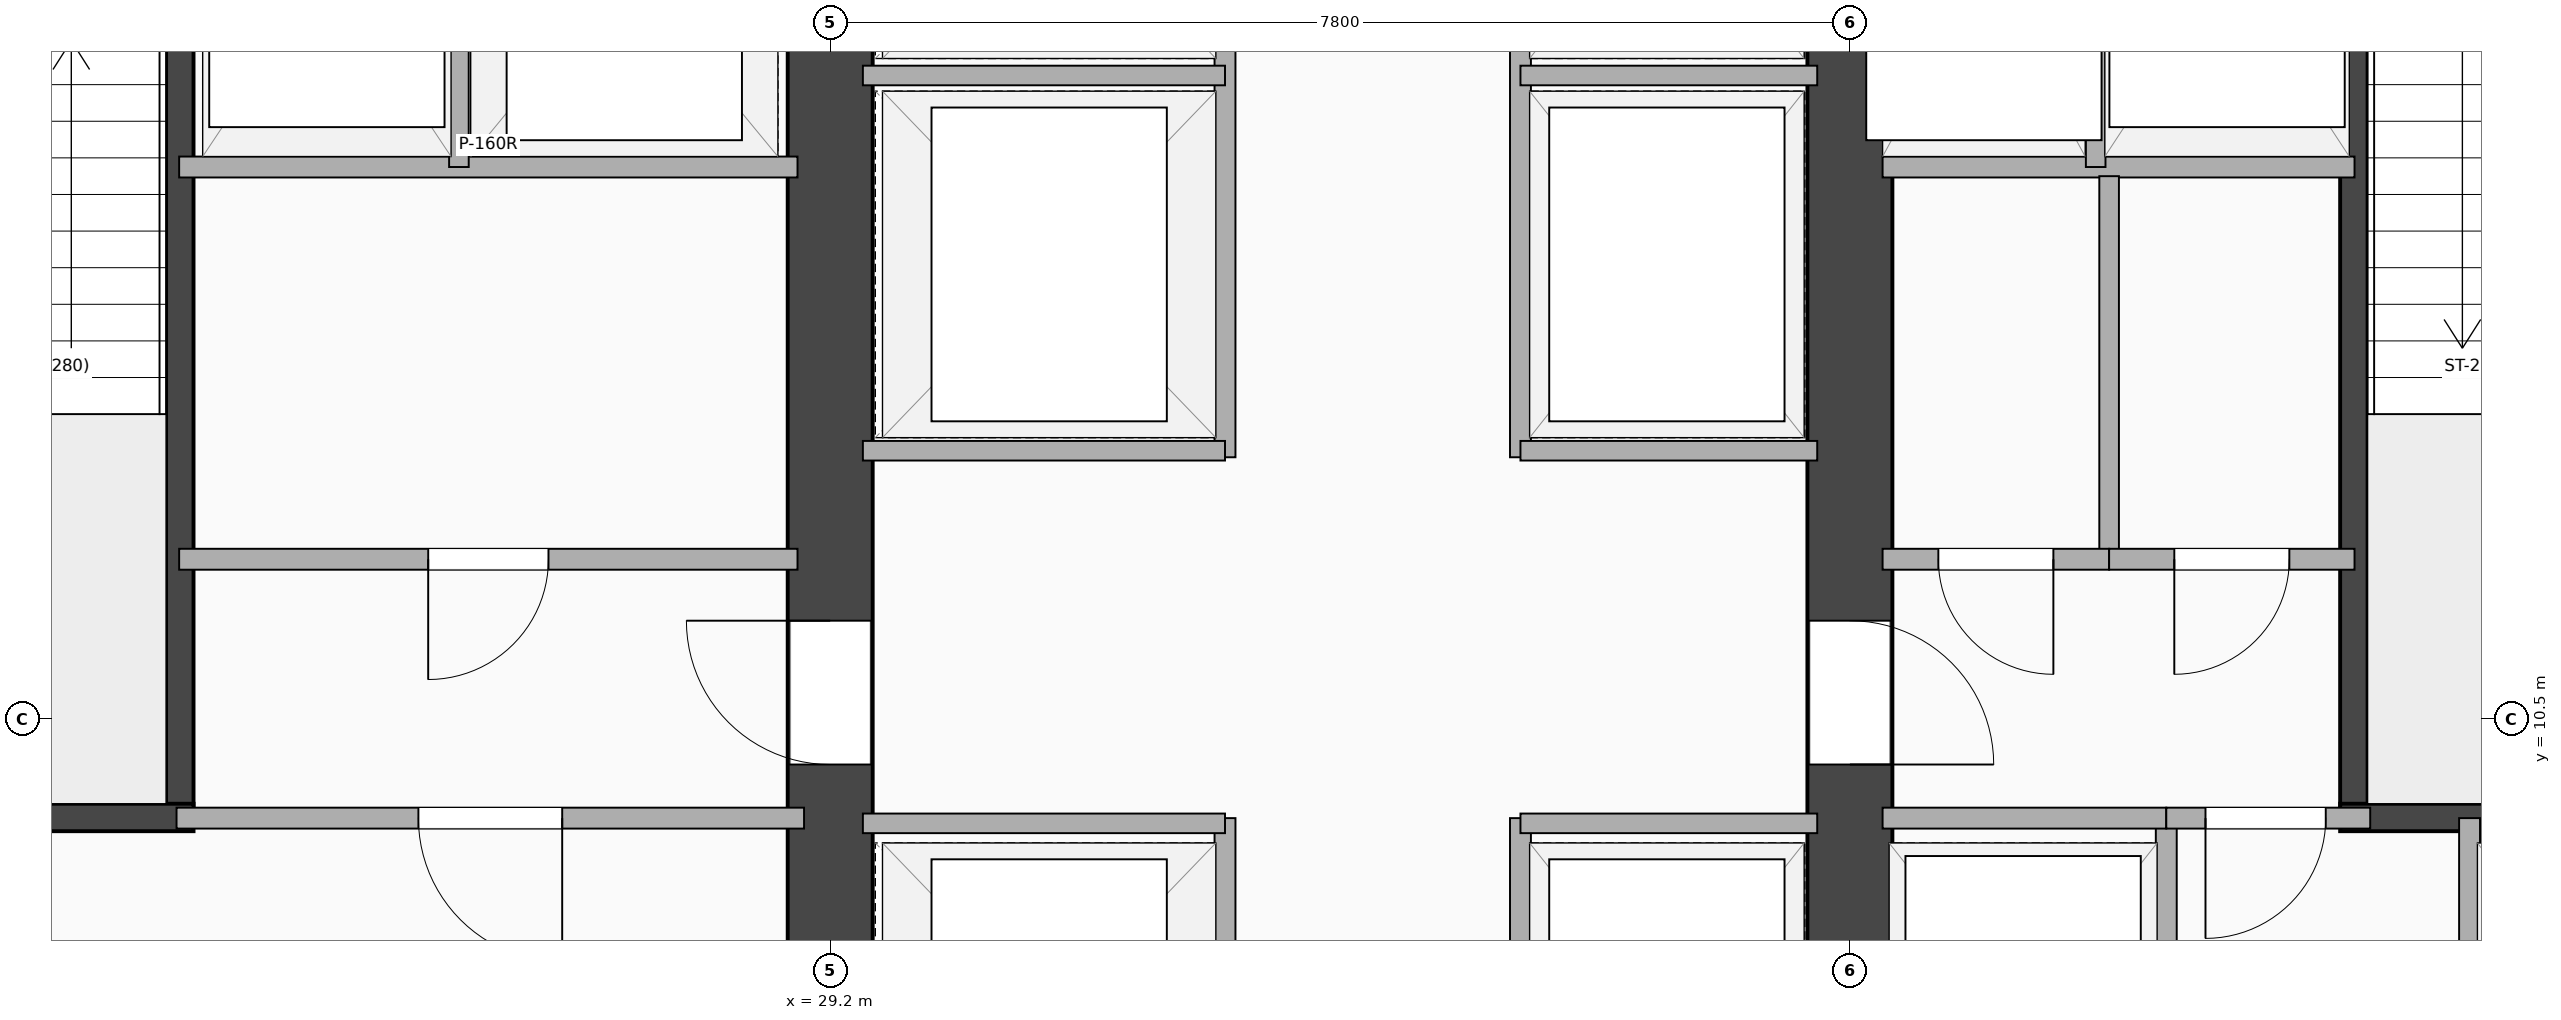
"""IFC4 building model, lengths in metres.
Left out: names, types, materials, properties, quantities, classifications, styles, units other than length and angle.
Written with IfcOpenShell. Run it as: python <this file> out.ifc"""

import sys

from ifc_helpers import new_model, si_unit, direction, frame, frame_2d, origin, place, context, subcontext, project, spatial, rectangle, extrude, element, fill, save


model = new_model("IFC4")
c1 = context("Model", 3, precision=1e-05, world=origin(), true_north=direction((0.0, 1.0)))
c2 = subcontext(c1, "Body", "Model", "MODEL_VIEW")
j1 = project(units=[si_unit("LENGTHUNIT", "METRE"), si_unit("PLANEANGLEUNIT", "RADIAN")], contexts=[c1])
p1 = place(None, origin())
s1 = spatial("IfcSite", under=j1, at=p1, CompositionType="ELEMENT")
p2 = place(p1, origin())
s2 = spatial("IfcBuilding", under=s1, at=p2, CompositionType="ELEMENT")
p3 = place(p2, frame((0.0, 0.0, 5.4)))
s3 = spatial("IfcBuildingStorey", under=s2, at=p3, CompositionType="ELEMENT", Elevation=5.4)
p4 = place(p3, frame((29.2, 3.5, 0.0), z_axis=(0.0, 0.0, 1.0), x_axis=(0.0, 1.0, 0.0)))
e1 = element("IfcWall", 1, at=p4, inside=s3, PredefinedType="SHEAR", context=c2, shape_type="SweptSolid", body=[
    extrude(rectangle(XDim=16.9, YDim=0.65, at=frame_2d((8.45, 0.0))), origin(), (0.0, 0.0, 1.0), 4.3),
])
p5 = place(p4, frame((7.75, 0.0, 0.0), z_axis=(0.0, 0.0, 1.0), x_axis=(-1.0, 0.0, 0.0)))
e2 = element("IfcOpeningElement", 2, at=p5, cuts=e1, PredefinedType="OPENING", context=c2, shape_type="SweptSolid", body=[
    extrude(rectangle(XDim=1.1, YDim=2.15, at=frame_2d((0.55, 1.075))), frame((0.0, 0.335, 0.0), z_axis=(0.0, -1.0, 0.0), x_axis=(1.0, 0.0, 0.0)), (0.0, 0.0, 1.0), 0.67),
])
p6 = place(p3, frame((37.0, 3.5, 0.0), z_axis=(0.0, 0.0, 1.0), x_axis=(0.0, 1.0, 0.0)))
e3 = element("IfcWall", 3, at=p6, inside=s3, PredefinedType="SHEAR", context=c2, shape_type="SweptSolid", body=[
    extrude(rectangle(XDim=16.9, YDim=0.65, at=frame_2d((8.45, 0.0))), origin(), (0.0, 0.0, 1.0), 4.3),
])
p7 = place(p6, frame((6.65, 0.0, 0.0)))
e4 = element("IfcOpeningElement", 4, at=p7, cuts=e3, PredefinedType="OPENING", context=c2, shape_type="SweptSolid", body=[
    extrude(rectangle(XDim=1.1, YDim=2.15, at=frame_2d((0.55, 1.075))), frame((0.0, 0.335, 0.0), z_axis=(0.0, -1.0, 0.0), x_axis=(1.0, 0.0, 0.0)), (0.0, 0.0, 1.0), 0.67),
])
p8 = place(p3, frame((24.225, 9.745, 0.0), z_axis=(0.0, 0.0, 1.0), x_axis=(0.0, 1.0, 0.0)))
e5 = element("IfcWall", 5, at=p8, inside=s3, PredefinedType="SHEAR", context=c2, shape_type="SweptSolid", body=[
    extrude(rectangle(XDim=8.01, YDim=0.21, at=frame_2d((4.005, 0.0))), origin(), (0.0, 0.0, 1.0), 4.3),
])
p9 = place(p3, frame((20.67, 9.745, 0.0), z_axis=(0.0, 0.0, 1.0), x_axis=(1.0, 0.0, 0.0)))
e6 = element("IfcWall", 6, at=p9, inside=s3, PredefinedType="SHEAR", context=c2, shape_type="SweptSolid", body=[
    extrude(rectangle(XDim=3.66, YDim=0.21, at=frame_2d((1.83, 0.0))), origin(), (0.0, 0.0, 1.0), 4.3),
])
p10 = place(p3, frame((40.855, 9.745, 0.0), z_axis=(0.0, 0.0, 1.0), x_axis=(0.0, 1.0, 0.0)))
e7 = element("IfcWall", 7, at=p10, inside=s3, PredefinedType="SHEAR", context=c2, shape_type="SweptSolid", body=[
    extrude(rectangle(XDim=8.01, YDim=0.21, at=frame_2d((4.005, 0.0))), origin(), (0.0, 0.0, 1.0), 4.3),
])
p11 = place(p3, frame((40.75, 9.745, 0.0), z_axis=(0.0, 0.0, 1.0), x_axis=(1.0, 0.0, 0.0)))
e8 = element("IfcWall", 8, at=p11, inside=s3, PredefinedType="SHEAR", context=c2, shape_type="SweptSolid", body=[
    extrude(rectangle(XDim=3.66, YDim=0.21, at=frame_2d((1.83, 0.0))), origin(), (0.0, 0.0, 1.0), 4.3),
])
p12 = place(p3, frame((24.22, 14.72, 0.0), z_axis=(0.0, 0.0, 1.0), x_axis=(1.0, 0.0, 0.0)))
e9 = element("IfcWall", 9, at=p12, inside=s3, PredefinedType="PARTITIONING", context=c2, shape_type="SweptSolid", body=[
    extrude(rectangle(XDim=4.73, YDim=0.16, at=frame_2d((2.365, 0.0))), origin(), (0.0, 0.0, 1.0), 3.43),
])
p13 = place(p3, frame((26.36, 14.72, 0.0), z_axis=(0.0, 0.0, 1.0), x_axis=(0.0, 1.0, 0.0)))
e10 = element("IfcWall", 10, at=p13, inside=s3, PredefinedType="PARTITIONING", context=c2, shape_type="SweptSolid", body=[
    extrude(rectangle(XDim=3.04, YDim=0.15, at=frame_2d((1.52, 0.0))), origin(), (0.0, 0.0, 1.0), 4.3),
])
p14 = place(p3, frame((37.25, 14.72, 0.0), z_axis=(0.0, 0.0, 1.0), x_axis=(1.0, 0.0, 0.0)))
e11 = element("IfcWall", 11, at=p14, inside=s3, PredefinedType="PARTITIONING", context=c2, shape_type="SweptSolid", body=[
    extrude(rectangle(XDim=3.61, YDim=0.16, at=frame_2d((1.805, 0.0))), origin(), (0.0, 0.0, 1.0), 3.43),
])
p15 = place(p3, frame((38.88, 14.72, 0.0), z_axis=(0.0, 0.0, 1.0), x_axis=(0.0, 1.0, 0.0)))
e12 = element("IfcWall", 12, at=p15, inside=s3, PredefinedType="PARTITIONING", context=c2, shape_type="SweptSolid", body=[
    extrude(rectangle(XDim=3.04, YDim=0.15, at=frame_2d((1.52, 0.0))), origin(), (0.0, 0.0, 1.0), 4.3),
])
p16 = place(p3, frame((24.22, 11.72, 0.0), z_axis=(0.0, 0.0, 1.0), x_axis=(1.0, 0.0, 0.0)))
e13 = element("IfcWall", 13, at=p16, inside=s3, PredefinedType="PARTITIONING", context=c2, shape_type="SweptSolid", body=[
    extrude(rectangle(XDim=4.73, YDim=0.16, at=frame_2d((2.365, 0.0))), origin(), (0.0, 0.0, 1.0), 3.43),
])
p17 = place(p16, frame((1.905, 0.0, 0.0)))
e14 = element("IfcOpeningElement", 14, at=p17, cuts=e13, PredefinedType="OPENING", context=c2, shape_type="SweptSolid", body=[
    extrude(rectangle(XDim=0.92, YDim=2.08, at=frame_2d((0.46, 1.04))), frame((0.0, 0.09, 0.0), z_axis=(0.0, -1.0, 0.0), x_axis=(1.0, 0.0, 0.0)), (0.0, 0.0, 1.0), 0.18),
])
p18 = place(p3, frame((38.983, 11.72, 0.0), z_axis=(0.0, 0.0, 1.0), x_axis=(0.0, 1.0, 0.0)))
e15 = element("IfcWall", 15, at=p18, inside=s3, PredefinedType="PARTITIONING", context=c2, shape_type="SweptSolid", body=[
    extrude(rectangle(XDim=2.93, YDim=0.15, at=frame_2d((1.465, 0.0))), origin(), (0.0, 0.0, 1.0), 4.3),
])
p19 = place(p3, frame((37.25, 11.72, 0.0), z_axis=(0.0, 0.0, 1.0), x_axis=(1.0, 0.0, 0.0)))
e16 = element("IfcWall", 16, at=p19, inside=s3, PredefinedType="PARTITIONING", context=c2, shape_type="SweptSolid", body=[
    extrude(rectangle(XDim=1.733, YDim=0.16, at=frame_2d((0.866, 0.0))), origin(), (0.0, 0.0, 1.0), 3.43),
])
p20 = place(p19, frame((0.427, 0.0, 0.0)))
e17 = element("IfcOpeningElement", 17, at=p20, cuts=e16, PredefinedType="OPENING", context=c2, shape_type="SweptSolid", body=[
    extrude(rectangle(XDim=0.88, YDim=2.08, at=frame_2d((0.44, 1.04))), frame((0.0, 0.09, 0.0), z_axis=(0.0, -1.0, 0.0), x_axis=(1.0, 0.0, 0.0)), (0.0, 0.0, 1.0), 0.18),
])
p21 = place(p3, frame((38.983, 11.72, 0.0), z_axis=(0.0, 0.0, 1.0), x_axis=(1.0, 0.0, 0.0)))
e18 = element("IfcWall", 18, at=p21, inside=s3, PredefinedType="PARTITIONING", context=c2, shape_type="SweptSolid", body=[
    extrude(rectangle(XDim=1.877, YDim=0.16, at=frame_2d((0.938, 0.0))), origin(), (0.0, 0.0, 1.0), 4.3),
])
p22 = place(p21, frame((0.499, 0.0, 0.0)))
e19 = element("IfcOpeningElement", 19, at=p22, cuts=e18, PredefinedType="OPENING", context=c2, shape_type="SweptSolid", body=[
    extrude(rectangle(XDim=0.88, YDim=2.08, at=frame_2d((0.44, 1.04))), frame((0.0, 0.09, 0.0), z_axis=(0.0, -1.0, 0.0), x_axis=(1.0, 0.0, 0.0)), (0.0, 0.0, 1.0), 0.18),
])
p23 = place(p3, frame((24.2, 9.74, 0.0), z_axis=(0.0, 0.0, 1.0), x_axis=(1.0, 0.0, 0.0)))
e20 = element("IfcWall", 20, at=p23, inside=s3, PredefinedType="PARTITIONING", context=c2, shape_type="SweptSolid", body=[
    extrude(rectangle(XDim=4.8, YDim=0.16, at=frame_2d((2.4, 0.0))), origin(), (0.0, 0.0, 1.0), 3.43),
])
p24 = place(p23, frame((1.85, 0.0, 0.0)))
e21 = element("IfcOpeningElement", 21, at=p24, cuts=e20, PredefinedType="OPENING", context=c2, shape_type="SweptSolid", body=[
    extrude(rectangle(XDim=1.1, YDim=2.15, at=frame_2d((0.55, 1.075))), frame((0.0, 0.09, 0.0), z_axis=(0.0, -1.0, 0.0), x_axis=(1.0, 0.0, 0.0)), (0.0, 0.0, 1.0), 0.18),
])
for number, where, z_axis, x_axis in (
    (22, (39.42, 3.9, 0.0), (0.0, 0.0, 1.0), (0.0, 1.0, 0.0)),
    (23, (41.74, 3.9, 0.0), (0.0, 0.0, 1.0), (0.0, 1.0, 0.0)),
):
    element("IfcWall", number, at=place(p3, frame(where, z_axis=z_axis, x_axis=x_axis)), inside=s3, PredefinedType="PARTITIONING", context=c2, shape_type="SweptSolid", body=[
        extrude(rectangle(XDim=5.84, YDim=0.16, at=frame_2d((2.92, 0.0))), origin(), (0.0, 0.0, 1.0), 3.373),
    ])
p25 = place(p3, frame((37.25, 9.74, 0.0), z_axis=(0.0, 0.0, 1.0), x_axis=(1.0, 0.0, 0.0)))
e24 = element("IfcWall", 24, at=p25, inside=s3, PredefinedType="PARTITIONING", context=c2, shape_type="SweptSolid", body=[
    extrude(rectangle(XDim=2.17, YDim=0.16, at=frame_2d((1.085, 0.0))), origin(), (0.0, 0.0, 1.0), 3.43),
])
p26 = place(p3, frame((39.42, 9.74, 0.0), z_axis=(0.0, 0.0, 1.0), x_axis=(1.0, 0.0, 0.0)))
e25 = element("IfcWall", 25, at=p26, inside=s3, PredefinedType="PARTITIONING", context=c2, shape_type="SweptSolid", body=[
    extrude(rectangle(XDim=1.56, YDim=0.16, at=frame_2d((0.78, 0.0))), origin(), (0.0, 0.0, 1.0), 4.3),
])
p27 = place(p26, frame((0.3, 0.0, 0.0)))
e26 = element("IfcOpeningElement", 26, at=p27, cuts=e25, PredefinedType="OPENING", context=c2, shape_type="SweptSolid", body=[
    extrude(rectangle(XDim=0.92, YDim=2.08, at=frame_2d((0.46, 1.04))), frame((0.0, 0.09, 0.0), z_axis=(0.0, -1.0, 0.0), x_axis=(1.0, 0.0, 0.0)), (0.0, 0.0, 1.0), 0.18),
])
p28 = place(p3, frame((32.22, 3.9, 0.0), z_axis=(0.0, 0.0, 1.0), x_axis=(0.0, 1.0, 0.0)))
e27 = element("IfcWall", 27, at=p28, inside=s3, PredefinedType="PARTITIONING", context=c2, shape_type="SweptSolid", body=[
    extrude(rectangle(XDim=5.84, YDim=0.16, at=frame_2d((2.92, 0.0))), origin(), (0.0, 0.0, 1.0), 3.373),
])
p29 = place(p28, frame((1.78, 0.0, 0.0), z_axis=(0.0, 0.0, 1.0), x_axis=(-1.0, 0.0, 0.0)))
e28 = element("IfcOpeningElement", 28, at=p29, cuts=e27, PredefinedType="OPENING", context=c2, shape_type="SweptSolid", body=[
    extrude(rectangle(XDim=1.08, YDim=2.16, at=frame_2d((0.54, 1.08))), frame((0.0, 0.09, 0.0), z_axis=(0.0, -1.0, 0.0), x_axis=(1.0, 0.0, 0.0)), (0.0, 0.0, 1.0), 0.18),
])
p30 = place(p28, frame((4.68, 0.0, 0.0), z_axis=(0.0, 0.0, 1.0), x_axis=(-1.0, 0.0, 0.0)))
e29 = element("IfcOpeningElement", 29, at=p30, cuts=e27, PredefinedType="OPENING", context=c2, shape_type="SweptSolid", body=[
    extrude(rectangle(XDim=1.08, YDim=2.16, at=frame_2d((0.54, 1.08))), frame((0.0, 0.09, 0.0), z_axis=(0.0, -1.0, 0.0), x_axis=(1.0, 0.0, 0.0)), (0.0, 0.0, 1.0), 0.18),
])
p31 = place(p3, frame((34.48, 3.9, 0.0), z_axis=(0.0, 0.0, 1.0), x_axis=(0.0, 1.0, 0.0)))
e30 = element("IfcWall", 30, at=p31, inside=s3, PredefinedType="PARTITIONING", context=c2, shape_type="SweptSolid", body=[
    extrude(rectangle(XDim=5.84, YDim=0.16, at=frame_2d((2.92, 0.0))), origin(), (0.0, 0.0, 1.0), 3.373),
])
p32 = place(p31, frame((0.7, 0.0, 0.0)))
e31 = element("IfcOpeningElement", 31, at=p32, cuts=e30, PredefinedType="OPENING", context=c2, shape_type="SweptSolid", body=[
    extrude(rectangle(XDim=1.08, YDim=2.16, at=frame_2d((0.54, 1.08))), frame((0.0, 0.09, 0.0), z_axis=(0.0, -1.0, 0.0), x_axis=(1.0, 0.0, 0.0)), (0.0, 0.0, 1.0), 0.18),
])
p33 = place(p31, frame((3.6, 0.0, 0.0)))
e32 = element("IfcOpeningElement", 32, at=p33, cuts=e30, PredefinedType="OPENING", context=c2, shape_type="SweptSolid", body=[
    extrude(rectangle(XDim=1.08, YDim=2.16, at=frame_2d((0.54, 1.08))), frame((0.0, 0.09, 0.0), z_axis=(0.0, -1.0, 0.0), x_axis=(1.0, 0.0, 0.0)), (0.0, 0.0, 1.0), 0.18),
])
p34 = place(p3, frame((29.45, 9.7, 0.0), z_axis=(0.0, 0.0, 1.0), x_axis=(1.0, 0.0, 0.0)))
e33 = element("IfcWall", 33, at=p34, inside=s3, PredefinedType="PARTITIONING", context=c2, shape_type="SweptSolid", body=[
    extrude(rectangle(XDim=2.77, YDim=0.15, at=frame_2d((1.385, 0.0))), origin(), (0.0, 0.0, 1.0), 3.43),
])
p35 = place(p3, frame((34.48, 9.7, 0.0), z_axis=(0.0, 0.0, 1.0), x_axis=(1.0, 0.0, 0.0)))
e34 = element("IfcWall", 34, at=p35, inside=s3, PredefinedType="PARTITIONING", context=c2, shape_type="SweptSolid", body=[
    extrude(rectangle(XDim=2.27, YDim=0.15, at=frame_2d((1.135, 0.0))), origin(), (0.0, 0.0, 1.0), 3.43),
])
p36 = place(p3, frame((32.22, 12.5, 0.0), z_axis=(0.0, 0.0, 1.0), x_axis=(0.0, 1.0, 0.0)))
e35 = element("IfcWall", 35, at=p36, inside=s3, PredefinedType="PARTITIONING", context=c2, shape_type="SweptSolid", body=[
    extrude(rectangle(XDim=7.92, YDim=0.16, at=frame_2d((3.96, 0.0))), origin(), (0.0, 0.0, 1.0), 3.373),
])
p37 = place(p36, frame((6.1, 0.0, 0.0)))
e36 = element("IfcOpeningElement", 36, at=p37, cuts=e35, PredefinedType="OPENING", context=c2, shape_type="SweptSolid", body=[
    extrude(rectangle(XDim=0.88, YDim=2.08, at=frame_2d((0.44, 1.04))), frame((0.0, 0.09, 0.0), z_axis=(0.0, -1.0, 0.0), x_axis=(1.0, 0.0, 0.0)), (0.0, 0.0, 1.0), 0.18),
])
p38 = place(p3, frame((34.48, 12.5, 0.0), z_axis=(0.0, 0.0, 1.0), x_axis=(0.0, 1.0, 0.0)))
e37 = element("IfcWall", 37, at=p38, inside=s3, PredefinedType="PARTITIONING", context=c2, shape_type="SweptSolid", body=[
    extrude(rectangle(XDim=7.92, YDim=0.16, at=frame_2d((3.96, 0.0))), origin(), (0.0, 0.0, 1.0), 3.373),
])
p39 = place(p38, frame((6.98, 0.0, 0.0), z_axis=(0.0, 0.0, 1.0), x_axis=(-1.0, 0.0, 0.0)))
e38 = element("IfcOpeningElement", 38, at=p39, cuts=e37, PredefinedType="OPENING", context=c2, shape_type="SweptSolid", body=[
    extrude(rectangle(XDim=0.88, YDim=2.08, at=frame_2d((0.44, 1.04))), frame((0.0, 0.09, 0.0), z_axis=(0.0, -1.0, 0.0), x_axis=(1.0, 0.0, 0.0)), (0.0, 0.0, 1.0), 0.18),
])
p40 = place(p3, frame((29.45, 12.55, 0.0), z_axis=(0.0, 0.0, 1.0), x_axis=(1.0, 0.0, 0.0)))
e39 = element("IfcWall", 39, at=p40, inside=s3, PredefinedType="PARTITIONING", context=c2, shape_type="SweptSolid", body=[
    extrude(rectangle(XDim=2.77, YDim=0.15, at=frame_2d((1.385, 0.0))), origin(), (0.0, 0.0, 1.0), 3.43),
])
p41 = place(p3, frame((34.48, 12.55, 0.0), z_axis=(0.0, 0.0, 1.0), x_axis=(1.0, 0.0, 0.0)))
e40 = element("IfcWall", 40, at=p41, inside=s3, PredefinedType="PARTITIONING", context=c2, shape_type="SweptSolid", body=[
    extrude(rectangle(XDim=2.27, YDim=0.15, at=frame_2d((1.135, 0.0))), origin(), (0.0, 0.0, 1.0), 3.43),
])
p42 = place(p3, frame((29.45, 15.42, 0.0), z_axis=(0.0, 0.0, 1.0), x_axis=(1.0, 0.0, 0.0)))
e41 = element("IfcWall", 41, at=p42, inside=s3, PredefinedType="PARTITIONING", context=c2, shape_type="SweptSolid", body=[
    extrude(rectangle(XDim=2.77, YDim=0.15, at=frame_2d((1.385, 0.0))), origin(), (0.0, 0.0, 1.0), 3.43),
])
p43 = place(p3, frame((34.48, 15.42, 0.0), z_axis=(0.0, 0.0, 1.0), x_axis=(1.0, 0.0, 0.0)))
e42 = element("IfcWall", 42, at=p43, inside=s3, PredefinedType="PARTITIONING", context=c2, shape_type="SweptSolid", body=[
    extrude(rectangle(XDim=2.27, YDim=0.15, at=frame_2d((1.135, 0.0))), origin(), (0.0, 0.0, 1.0), 3.43),
])
p44 = place(p5, origin())
e43 = element("IfcDoor", 43, at=p44, inside=s3, OperationType="SINGLE_SWING_RIGHT", PredefinedType="DOOR", context=c2, shape_type="SweptSolid", body=[
    extrude(rectangle(XDim=1.1, YDim=2.15, at=frame_2d((0.55, 1.075))), frame((0.0, 0.025, 0.0), z_axis=(0.0, -1.0, 0.0), x_axis=(1.0, 0.0, 0.0)), (0.0, 0.0, 1.0), 0.05),
])
fill(e2, e43)
p45 = place(p7, origin())
e44 = element("IfcDoor", 44, at=p45, inside=s3, OperationType="SINGLE_SWING_LEFT", PredefinedType="DOOR", context=c2, shape_type="SweptSolid", body=[
    extrude(rectangle(XDim=1.1, YDim=2.15, at=frame_2d((0.55, 1.075))), frame((0.0, 0.025, 0.0), z_axis=(0.0, -1.0, 0.0), x_axis=(1.0, 0.0, 0.0)), (0.0, 0.0, 1.0), 0.05),
])
fill(e4, e44)
p46 = place(p17, origin())
e45 = element("IfcDoor", 45, at=p46, inside=s3, OperationType="SINGLE_SWING_LEFT", PredefinedType="DOOR", context=c2, shape_type="SweptSolid", body=[
    extrude(rectangle(XDim=0.92, YDim=2.08, at=frame_2d((0.46, 1.04))), frame((0.0, 0.025, 0.0), z_axis=(0.0, -1.0, 0.0), x_axis=(1.0, 0.0, 0.0)), (0.0, 0.0, 1.0), 0.05),
])
fill(e14, e45)
p47 = place(p20, origin())
e46 = element("IfcDoor", 46, at=p47, inside=s3, OperationType="SINGLE_SWING_RIGHT", PredefinedType="DOOR", context=c2, shape_type="SweptSolid", body=[
    extrude(rectangle(XDim=0.88, YDim=2.08, at=frame_2d((0.44, 1.04))), frame((0.0, 0.025, 0.0), z_axis=(0.0, -1.0, 0.0), x_axis=(1.0, 0.0, 0.0)), (0.0, 0.0, 1.0), 0.05),
])
fill(e17, e46)
p48 = place(p22, origin())
e47 = element("IfcDoor", 47, at=p48, inside=s3, OperationType="SINGLE_SWING_LEFT", PredefinedType="DOOR", context=c2, shape_type="SweptSolid", body=[
    extrude(rectangle(XDim=0.88, YDim=2.08, at=frame_2d((0.44, 1.04))), frame((0.0, 0.025, 0.0), z_axis=(0.0, -1.0, 0.0), x_axis=(1.0, 0.0, 0.0)), (0.0, 0.0, 1.0), 0.05),
])
fill(e19, e47)
p49 = place(p24, origin())
e48 = element("IfcDoor", 48, at=p49, inside=s3, OperationType="SINGLE_SWING_RIGHT", PredefinedType="DOOR", context=c2, shape_type="SweptSolid", body=[
    extrude(rectangle(XDim=1.1, YDim=2.15, at=frame_2d((0.55, 1.075))), frame((0.0, 0.025, 0.0), z_axis=(0.0, -1.0, 0.0), x_axis=(1.0, 0.0, 0.0)), (0.0, 0.0, 1.0), 0.05),
])
fill(e21, e48)
p50 = place(p27, origin())
e49 = element("IfcDoor", 49, at=p50, inside=s3, OperationType="SINGLE_SWING_LEFT", PredefinedType="DOOR", context=c2, shape_type="SweptSolid", body=[
    extrude(rectangle(XDim=0.92, YDim=2.08, at=frame_2d((0.46, 1.04))), frame((0.0, 0.025, 0.0), z_axis=(0.0, -1.0, 0.0), x_axis=(1.0, 0.0, 0.0)), (0.0, 0.0, 1.0), 0.05),
])
fill(e26, e49)
save(model, sys.argv[1])
